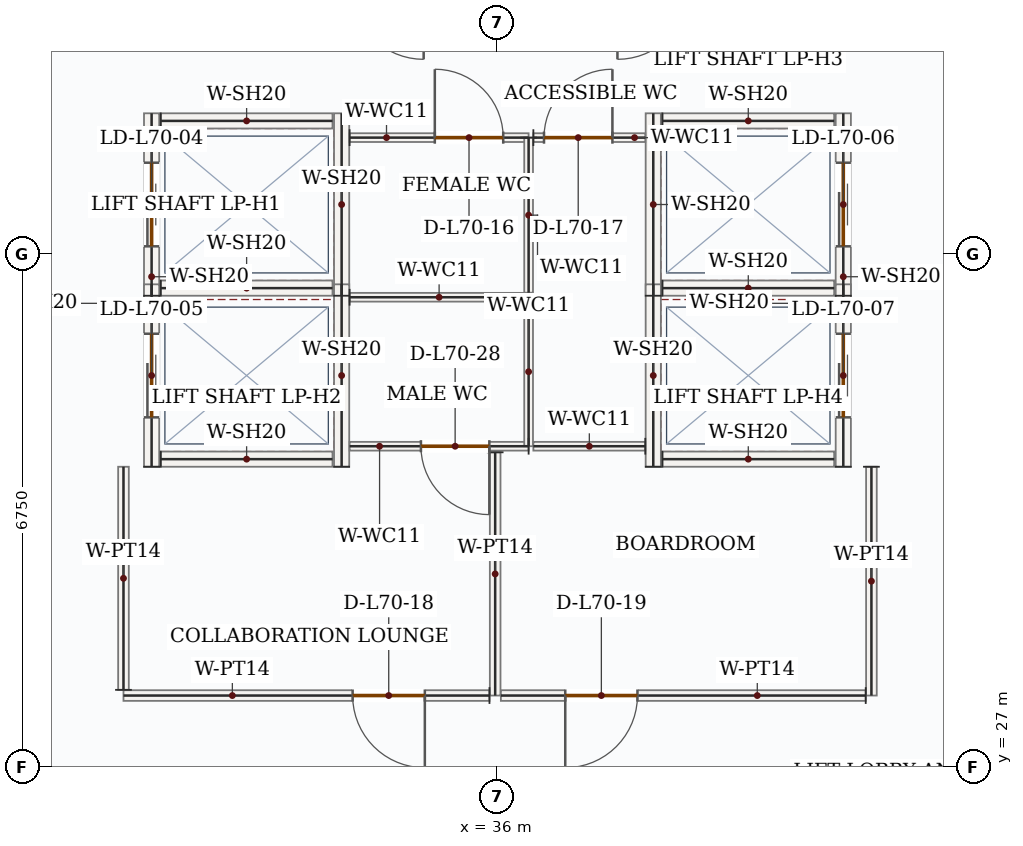
"""IFC4 building model, lengths in metres.
Left out: names, types, materials, properties, quantities, classifications, styles, units other than length and angle.
Written with IfcOpenShell. Run it as: python <this file> out.ifc"""

import sys

from ifc_helpers import new_model, si_unit, direction, frame, frame_2d, origin, place, context, subcontext, project, spatial, rectangle, extrude, source, transform, mapped, element, fill, save


model = new_model("IFC4")
c1 = context("Model", 3, precision=1e-05, world=origin(), true_north=direction((0.0, 1.0)))
c2 = subcontext(c1, "Body", "Model", "MODEL_VIEW")
j1 = project(units=[si_unit("LENGTHUNIT", "METRE"), si_unit("PLANEANGLEUNIT", "RADIAN")], contexts=[c1])
p1 = place(None, origin())
s1 = spatial("IfcSite", under=j1, at=p1, CompositionType="ELEMENT")
p2 = place(p1, origin())
s2 = spatial("IfcBuilding", under=s1, at=p2, CompositionType="ELEMENT")
p3 = place(p2, frame((0.0, 0.0, 291.6)))
s3 = spatial("IfcBuildingStorey", under=s2, at=p3, CompositionType="ELEMENT", Elevation=291.6)
p4 = place(p3, frame((31.45, 33.2, 0.0), z_axis=(0.0, 0.0, 1.0), x_axis=(0.0, 1.0, 0.0)))
e1 = element("IfcWall", 1, at=p4, inside=s3, PredefinedType="SOLIDWALL", context=c2, shape_type="SweptSolid", body=[
    extrude(rectangle(XDim=2.4, YDim=0.2, at=frame_2d((1.2, 0.0))), origin(), (0.0, 0.0, 1.0), 3.5),
])
p5 = place(p4, frame((0.65, 0.0, 0.0)))
e2 = element("IfcOpeningElement", 2, at=p5, cuts=e1, PredefinedType="OPENING", context=c2, shape_type="SweptSolid", body=[
    extrude(rectangle(XDim=1.1, YDim=2.15, at=frame_2d((0.55, 1.075))), frame((0.0, 0.11, 0.0), z_axis=(0.0, -1.0, 0.0), x_axis=(1.0, 0.0, 0.0)), (0.0, 0.0, 1.0), 0.22),
])
m1 = source(origin(), c2, "Body", "SweptSolid", [
    extrude(rectangle(XDim=2.4, YDim=0.2, at=frame_2d((1.2, 0.0))), origin(), (0.0, 0.0, 1.0), 3.5),
])
p6 = place(p3, frame((33.95, 33.2, 0.0), z_axis=(0.0, 0.0, 1.0), x_axis=(0.0, 1.0, 0.0)))
e3 = element("IfcWall", 3, at=p6, inside=s3, PredefinedType="SOLIDWALL", context=c2, shape_type="MappedRepresentation", body=[
    mapped(m1, transform((0.0, 0.0, 0.0), x_axis=(1.0, 0.0, 0.0), y_axis=(0.0, 1.0, 0.0), z_axis=(0.0, 0.0, 1.0), scale=1.0)),
])
m2 = source(origin(), c2, "Body", "SweptSolid", [
    extrude(rectangle(XDim=2.26, YDim=0.2, at=frame_2d((1.13, 0.0))), origin(), (0.0, 0.0, 1.0), 3.5),
])
for number, where, z_axis, x_axis in (
    (4, (31.57, 33.3, 0.0), (0.0, 0.0, 1.0), (1.0, 0.0, 0.0)),
    (5, (31.57, 35.5, 0.0), (0.0, 0.0, 1.0), (1.0, 0.0, 0.0)),
):
    element("IfcWall", number, at=place(p3, frame(where, z_axis=z_axis, x_axis=x_axis)), inside=s3, PredefinedType="SOLIDWALL", context=c2, shape_type="MappedRepresentation", body=[
        mapped(m2, transform((0.0, 0.0, 0.0), x_axis=(1.0, 0.0, 0.0), y_axis=(0.0, 1.0, 0.0), z_axis=(0.0, 0.0, 1.0), scale=1.0)),
    ])
p7 = place(p3, frame((31.45, 30.95, 0.0), z_axis=(0.0, 0.0, 1.0), x_axis=(0.0, 1.0, 0.0)))
e6 = element("IfcWall", 6, at=p7, inside=s3, PredefinedType="SOLIDWALL", context=c2, shape_type="SweptSolid", body=[
    extrude(rectangle(XDim=2.4, YDim=0.2, at=frame_2d((1.2, 0.0))), origin(), (0.0, 0.0, 1.0), 3.5),
])
p8 = place(p7, frame((0.65, 0.0, 0.0)))
e7 = element("IfcOpeningElement", 7, at=p8, cuts=e6, PredefinedType="OPENING", context=c2, shape_type="SweptSolid", body=[
    extrude(rectangle(XDim=1.1, YDim=2.15, at=frame_2d((0.55, 1.075))), frame((0.0, 0.11, 0.0), z_axis=(0.0, -1.0, 0.0), x_axis=(1.0, 0.0, 0.0)), (0.0, 0.0, 1.0), 0.22),
])
p9 = place(p3, frame((33.95, 30.95, 0.0), z_axis=(0.0, 0.0, 1.0), x_axis=(0.0, 1.0, 0.0)))
e8 = element("IfcWall", 8, at=p9, inside=s3, PredefinedType="SOLIDWALL", context=c2, shape_type="MappedRepresentation", body=[
    mapped(m1, transform((0.0, 0.0, 0.0), x_axis=(1.0, 0.0, 0.0), y_axis=(0.0, 1.0, 0.0), z_axis=(0.0, 0.0, 1.0), scale=1.0)),
])
p10 = place(p3, frame((31.57, 31.05, 0.0), z_axis=(0.0, 0.0, 1.0), x_axis=(1.0, 0.0, 0.0)))
e9 = element("IfcWall", 9, at=p10, inside=s3, PredefinedType="SOLIDWALL", context=c2, shape_type="MappedRepresentation", body=[
    mapped(m2, transform((0.0, 0.0, 0.0), x_axis=(1.0, 0.0, 0.0), y_axis=(0.0, 1.0, 0.0), z_axis=(0.0, 0.0, 1.0), scale=1.0)),
])
p11 = place(p3, frame((38.05, 33.2, 0.0), z_axis=(0.0, 0.0, 1.0), x_axis=(0.0, 1.0, 0.0)))
e10 = element("IfcWall", 10, at=p11, inside=s3, PredefinedType="SOLIDWALL", context=c2, shape_type="MappedRepresentation", body=[
    mapped(m1, transform((0.0, 0.0, 0.0), x_axis=(1.0, 0.0, 0.0), y_axis=(0.0, 1.0, 0.0), z_axis=(0.0, 0.0, 1.0), scale=1.0)),
])
p12 = place(p3, frame((40.55, 33.2, 0.0), z_axis=(0.0, 0.0, 1.0), x_axis=(0.0, 1.0, 0.0)))
e11 = element("IfcWall", 11, at=p12, inside=s3, PredefinedType="SOLIDWALL", context=c2, shape_type="SweptSolid", body=[
    extrude(rectangle(XDim=2.4, YDim=0.2, at=frame_2d((1.2, 0.0))), origin(), (0.0, 0.0, 1.0), 3.5),
])
p13 = place(p12, frame((0.65, 0.0, 0.0)))
e12 = element("IfcOpeningElement", 12, at=p13, cuts=e11, PredefinedType="OPENING", context=c2, shape_type="SweptSolid", body=[
    extrude(rectangle(XDim=1.1, YDim=2.15, at=frame_2d((0.55, 1.075))), frame((0.0, 0.11, 0.0), z_axis=(0.0, -1.0, 0.0), x_axis=(1.0, 0.0, 0.0)), (0.0, 0.0, 1.0), 0.22),
])
for number, where, z_axis, x_axis in (
    (13, (38.17, 33.3, 0.0), (0.0, 0.0, 1.0), (1.0, 0.0, 0.0)),
    (14, (38.17, 35.5, 0.0), (0.0, 0.0, 1.0), (1.0, 0.0, 0.0)),
):
    element("IfcWall", number, at=place(p3, frame(where, z_axis=z_axis, x_axis=x_axis)), inside=s3, PredefinedType="SOLIDWALL", context=c2, shape_type="MappedRepresentation", body=[
        mapped(m2, transform((0.0, 0.0, 0.0), x_axis=(1.0, 0.0, 0.0), y_axis=(0.0, 1.0, 0.0), z_axis=(0.0, 0.0, 1.0), scale=1.0)),
    ])
p14 = place(p3, frame((38.05, 30.95, 0.0), z_axis=(0.0, 0.0, 1.0), x_axis=(0.0, 1.0, 0.0)))
e15 = element("IfcWall", 15, at=p14, inside=s3, PredefinedType="SOLIDWALL", context=c2, shape_type="MappedRepresentation", body=[
    mapped(m1, transform((0.0, 0.0, 0.0), x_axis=(1.0, 0.0, 0.0), y_axis=(0.0, 1.0, 0.0), z_axis=(0.0, 0.0, 1.0), scale=1.0)),
])
p15 = place(p3, frame((40.55, 30.95, 0.0), z_axis=(0.0, 0.0, 1.0), x_axis=(0.0, 1.0, 0.0)))
e16 = element("IfcWall", 16, at=p15, inside=s3, PredefinedType="SOLIDWALL", context=c2, shape_type="SweptSolid", body=[
    extrude(rectangle(XDim=2.4, YDim=0.2, at=frame_2d((1.2, 0.0))), origin(), (0.0, 0.0, 1.0), 3.5),
])
p16 = place(p15, frame((0.65, 0.0, 0.0)))
e17 = element("IfcOpeningElement", 17, at=p16, cuts=e16, PredefinedType="OPENING", context=c2, shape_type="SweptSolid", body=[
    extrude(rectangle(XDim=1.1, YDim=2.15, at=frame_2d((0.55, 1.075))), frame((0.0, 0.11, 0.0), z_axis=(0.0, -1.0, 0.0), x_axis=(1.0, 0.0, 0.0)), (0.0, 0.0, 1.0), 0.22),
])
p17 = place(p3, frame((38.17, 31.05, 0.0), z_axis=(0.0, 0.0, 1.0), x_axis=(1.0, 0.0, 0.0)))
e18 = element("IfcWall", 18, at=p17, inside=s3, PredefinedType="SOLIDWALL", context=c2, shape_type="MappedRepresentation", body=[
    mapped(m2, transform((0.0, 0.0, 0.0), x_axis=(1.0, 0.0, 0.0), y_axis=(0.0, 1.0, 0.0), z_axis=(0.0, 0.0, 1.0), scale=1.0)),
])
p18 = place(p3, frame((36.41, 31.22, 0.0), z_axis=(0.0, 0.0, 1.0), x_axis=(-1.0, 0.0, 0.0)))
e19 = element("IfcWall", 19, at=p18, inside=s3, PredefinedType="PARTITIONING", context=c2, shape_type="SweptSolid", body=[
    extrude(rectangle(XDim=2.355, YDim=0.115, at=frame_2d((1.177, 0.0))), origin(), (0.0, 0.0, 1.0), 3.5),
])
p19 = place(p18, frame((0.517, 0.0, 0.0)))
e20 = element("IfcOpeningElement", 20, at=p19, cuts=e19, PredefinedType="OPENING", context=c2, shape_type="SweptSolid", body=[
    extrude(rectangle(XDim=0.9, YDim=2.1, at=frame_2d((0.45, 1.05))), frame((0.0, 0.067, 0.0), z_axis=(0.0, -1.0, 0.0), x_axis=(1.0, 0.0, 0.0)), (0.0, 0.0, 1.0), 0.135),
])
m3 = source(origin(), c2, "Body", "SweptSolid", [
    extrude(rectangle(XDim=2.355, YDim=0.115, at=frame_2d((1.177, 0.0))), origin(), (0.0, 0.0, 1.0), 3.5),
])
p20 = place(p3, frame((34.055, 33.18, 0.0), z_axis=(0.0, 0.0, 1.0), x_axis=(1.0, 0.0, 0.0)))
e21 = element("IfcWall", 21, at=p20, inside=s3, PredefinedType="PARTITIONING", context=c2, shape_type="MappedRepresentation", body=[
    mapped(m3, transform((0.0, 0.0, 0.0), x_axis=(1.0, 0.0, 0.0), y_axis=(0.0, 1.0, 0.0), z_axis=(0.0, 0.0, 1.0), scale=1.0)),
])
m4 = source(origin(), c2, "Body", "SweptSolid", [
    extrude(rectangle(XDim=1.96, YDim=0.115, at=frame_2d((0.98, 0.0))), origin(), (0.0, 0.0, 1.0), 3.5),
])
p21 = place(p3, frame((36.41, 33.18, 0.0), z_axis=(0.0, 0.0, 1.0), x_axis=(0.0, -1.0, 0.0)))
e22 = element("IfcWall", 22, at=p21, inside=s3, PredefinedType="PARTITIONING", context=c2, shape_type="MappedRepresentation", body=[
    mapped(m4, transform((0.0, 0.0, 0.0), x_axis=(1.0, 0.0, 0.0), y_axis=(0.0, 1.0, 0.0), z_axis=(0.0, 0.0, 1.0), scale=1.0)),
])
p22 = place(p3, frame((34.055, 35.28, 0.0), z_axis=(0.0, 0.0, 1.0), x_axis=(1.0, 0.0, 0.0)))
e23 = element("IfcWall", 23, at=p22, inside=s3, PredefinedType="PARTITIONING", context=c2, shape_type="SweptSolid", body=[
    extrude(rectangle(XDim=2.355, YDim=0.115, at=frame_2d((1.177, 0.0))), origin(), (0.0, 0.0, 1.0), 3.5),
])
p23 = place(p22, frame((1.121, 0.0, 0.0)))
e24 = element("IfcOpeningElement", 24, at=p23, cuts=e23, PredefinedType="OPENING", context=c2, shape_type="SweptSolid", body=[
    extrude(rectangle(XDim=0.9, YDim=2.1, at=frame_2d((0.45, 1.05))), frame((0.0, 0.067, 0.0), z_axis=(0.0, -1.0, 0.0), x_axis=(1.0, 0.0, 0.0)), (0.0, 0.0, 1.0), 0.135),
])
m5 = source(origin(), c2, "Body", "SweptSolid", [
    extrude(rectangle(XDim=2.04, YDim=0.115, at=frame_2d((1.02, 0.0))), origin(), (0.0, 0.0, 1.0), 3.5),
])
p24 = place(p3, frame((36.41, 35.28, 0.0), z_axis=(0.0, 0.0, 1.0), x_axis=(0.0, -1.0, 0.0)))
e25 = element("IfcWall", 25, at=p24, inside=s3, PredefinedType="PARTITIONING", context=c2, shape_type="MappedRepresentation", body=[
    mapped(m5, transform((0.0, 0.0, 0.0), x_axis=(1.0, 0.0, 0.0), y_axis=(0.0, 1.0, 0.0), z_axis=(0.0, 0.0, 1.0), scale=1.0)),
])
m6 = source(origin(), c2, "Body", "SweptSolid", [
    extrude(rectangle(XDim=1.473, YDim=0.115, at=frame_2d((0.736, 0.0))), origin(), (0.0, 0.0, 1.0), 3.5),
])
p25 = place(p3, frame((37.945, 31.22, 0.0), z_axis=(0.0, 0.0, 1.0), x_axis=(-1.0, 0.0, 0.0)))
e26 = element("IfcWall", 26, at=p25, inside=s3, PredefinedType="PARTITIONING", context=c2, shape_type="MappedRepresentation", body=[
    mapped(m6, transform((0.0, 0.0, 0.0), x_axis=(1.0, 0.0, 0.0), y_axis=(0.0, 1.0, 0.0), z_axis=(0.0, 0.0, 1.0), scale=1.0)),
])
p26 = place(p3, frame((36.472, 35.28, 0.0), z_axis=(0.0, 0.0, 1.0), x_axis=(1.0, 0.0, 0.0)))
e27 = element("IfcWall", 27, at=p26, inside=s3, PredefinedType="PARTITIONING", context=c2, shape_type="SweptSolid", body=[
    extrude(rectangle(XDim=1.473, YDim=0.115, at=frame_2d((0.736, 0.0))), origin(), (0.0, 0.0, 1.0), 3.5),
])
p27 = place(p26, frame((0.14, 0.0, 0.0)))
e28 = element("IfcOpeningElement", 28, at=p27, cuts=e27, PredefinedType="OPENING", context=c2, shape_type="SweptSolid", body=[
    extrude(rectangle(XDim=0.9, YDim=2.1, at=frame_2d((0.45, 1.05))), frame((0.0, 0.067, 0.0), z_axis=(0.0, -1.0, 0.0), x_axis=(1.0, 0.0, 0.0)), (0.0, 0.0, 1.0), 0.135),
])
m7 = source(origin(), c2, "Body", "SweptSolid", [
    extrude(rectangle(XDim=3.2, YDim=0.14, at=frame_2d((1.6, 0.0))), origin(), (0.0, 0.0, 1.0), 3.5),
])
p28 = place(p3, frame((35.97, 31.14, 0.0), z_axis=(0.0, 0.0, 1.0), x_axis=(0.0, -1.0, 0.0)))
e29 = element("IfcWall", 29, at=p28, inside=s3, PredefinedType="PARTITIONING", context=c2, shape_type="MappedRepresentation", body=[
    mapped(m7, transform((0.0, 0.0, 0.0), x_axis=(1.0, 0.0, 0.0), y_axis=(0.0, 1.0, 0.0), z_axis=(0.0, 0.0, 1.0), scale=1.0)),
])
p29 = place(p3, frame((35.895, 27.94, 0.0), z_axis=(0.0, 0.0, 1.0), x_axis=(-1.0, 0.0, 0.0)))
e30 = element("IfcWall", 30, at=p29, inside=s3, PredefinedType="PARTITIONING", context=c2, shape_type="SweptSolid", body=[
    extrude(rectangle(XDim=4.815, YDim=0.14, at=frame_2d((2.407, 0.0))), origin(), (0.0, 0.0, 1.0), 3.5),
])
p30 = place(p29, frame((0.85, 0.0, 0.0)))
e31 = element("IfcOpeningElement", 31, at=p30, cuts=e30, PredefinedType="OPENING", context=c2, shape_type="SweptSolid", body=[
    extrude(rectangle(XDim=0.95, YDim=2.15, at=frame_2d((0.475, 1.075))), frame((0.0, 0.08, 0.0), z_axis=(0.0, -1.0, 0.0), x_axis=(1.0, 0.0, 0.0)), (0.0, 0.0, 1.0), 0.16),
])
m8 = source(origin(), c2, "Body", "SweptSolid", [
    extrude(rectangle(XDim=2.935, YDim=0.14, at=frame_2d((1.468, 0.0))), origin(), (0.0, 0.0, 1.0), 3.5),
])
p31 = place(p3, frame((31.08, 28.015, 0.0), z_axis=(0.0, 0.0, 1.0), x_axis=(0.0, 1.0, 0.0)))
e32 = element("IfcWall", 32, at=p31, inside=s3, PredefinedType="PARTITIONING", context=c2, shape_type="MappedRepresentation", body=[
    mapped(m8, transform((0.0, 0.0, 0.0), x_axis=(1.0, 0.0, 0.0), y_axis=(0.0, 1.0, 0.0), z_axis=(0.0, 0.0, 1.0), scale=1.0)),
])
m9 = source(origin(), c2, "Body", "SweptSolid", [
    extrude(rectangle(XDim=3.01, YDim=0.14, at=frame_2d((1.505, 0.0))), origin(), (0.0, 0.0, 1.0), 3.5),
])
p32 = place(p3, frame((40.92, 30.95, 0.0), z_axis=(0.0, 0.0, 1.0), x_axis=(0.0, -1.0, 0.0)))
e33 = element("IfcWall", 33, at=p32, inside=s3, PredefinedType="PARTITIONING", context=c2, shape_type="MappedRepresentation", body=[
    mapped(m9, transform((0.0, 0.0, 0.0), x_axis=(1.0, 0.0, 0.0), y_axis=(0.0, 1.0, 0.0), z_axis=(0.0, 0.0, 1.0), scale=1.0)),
])
p33 = place(p3, frame((40.845, 27.94, 0.0), z_axis=(0.0, 0.0, 1.0), x_axis=(-1.0, 0.0, 0.0)))
e34 = element("IfcWall", 34, at=p33, inside=s3, PredefinedType="PARTITIONING", context=c2, shape_type="SweptSolid", body=[
    extrude(rectangle(XDim=4.8, YDim=0.14, at=frame_2d((2.4, 0.0))), origin(), (0.0, 0.0, 1.0), 3.5),
])
p34 = place(p33, frame((3.003, 0.0, 0.0)))
e35 = element("IfcOpeningElement", 35, at=p34, cuts=e34, PredefinedType="OPENING", context=c2, shape_type="SweptSolid", body=[
    extrude(rectangle(XDim=0.95, YDim=2.15, at=frame_2d((0.475, 1.075))), frame((0.0, 0.08, 0.0), z_axis=(0.0, -1.0, 0.0), x_axis=(1.0, 0.0, 0.0)), (0.0, 0.0, 1.0), 0.16),
])
m10 = source(origin(), c2, "Body", "SweptSolid", [
    extrude(rectangle(XDim=1.1, YDim=2.15, at=frame_2d((0.55, 1.075))), frame((0.0, 0.025, 0.0), z_axis=(0.0, -1.0, 0.0), x_axis=(1.0, 0.0, 0.0)), (0.0, 0.0, 1.0), 0.05),
])
p35 = place(p5, origin())
e36 = element("IfcDoor", 36, at=p35, inside=s3, OperationType="DOUBLE_DOOR_SLIDING", PredefinedType="DOOR", context=c2, shape_type="MappedRepresentation", body=[
    mapped(m10, transform((0.0, 0.0, 0.0), x_axis=(1.0, 0.0, 0.0), y_axis=(0.0, 1.0, 0.0), z_axis=(0.0, 0.0, 1.0), scale=1.0)),
])
fill(e2, e36)
p36 = place(p8, origin())
e37 = element("IfcDoor", 37, at=p36, inside=s3, OperationType="DOUBLE_DOOR_SLIDING", PredefinedType="DOOR", context=c2, shape_type="MappedRepresentation", body=[
    mapped(m10, transform((0.0, 0.0, 0.0), x_axis=(1.0, 0.0, 0.0), y_axis=(0.0, 1.0, 0.0), z_axis=(0.0, 0.0, 1.0), scale=1.0)),
])
fill(e7, e37)
p37 = place(p13, origin())
e38 = element("IfcDoor", 38, at=p37, inside=s3, OperationType="DOUBLE_DOOR_SLIDING", PredefinedType="DOOR", context=c2, shape_type="MappedRepresentation", body=[
    mapped(m10, transform((0.0, 0.0, 0.0), x_axis=(1.0, 0.0, 0.0), y_axis=(0.0, 1.0, 0.0), z_axis=(0.0, 0.0, 1.0), scale=1.0)),
])
fill(e12, e38)
p38 = place(p16, origin())
e39 = element("IfcDoor", 39, at=p38, inside=s3, OperationType="DOUBLE_DOOR_SLIDING", PredefinedType="DOOR", context=c2, shape_type="MappedRepresentation", body=[
    mapped(m10, transform((0.0, 0.0, 0.0), x_axis=(1.0, 0.0, 0.0), y_axis=(0.0, 1.0, 0.0), z_axis=(0.0, 0.0, 1.0), scale=1.0)),
])
fill(e17, e39)
m11 = source(origin(), c2, "Body", "SweptSolid", [
    extrude(rectangle(XDim=0.9, YDim=2.1, at=frame_2d((0.45, 1.05))), frame((0.0, 0.025, 0.0), z_axis=(0.0, -1.0, 0.0), x_axis=(1.0, 0.0, 0.0)), (0.0, 0.0, 1.0), 0.05),
])
p39 = place(p23, origin())
e40 = element("IfcDoor", 40, at=p39, inside=s3, OperationType="SINGLE_SWING_LEFT", PredefinedType="DOOR", context=c2, shape_type="MappedRepresentation", body=[
    mapped(m11, transform((0.0, 0.0, 0.0), x_axis=(1.0, 0.0, 0.0), y_axis=(0.0, 1.0, 0.0), z_axis=(0.0, 0.0, 1.0), scale=1.0)),
])
fill(e24, e40)
p40 = place(p27, origin())
e41 = element("IfcDoor", 41, at=p40, inside=s3, OperationType="SINGLE_SWING_RIGHT", PredefinedType="DOOR", context=c2, shape_type="MappedRepresentation", body=[
    mapped(m11, transform((0.0, 0.0, 0.0), x_axis=(1.0, 0.0, 0.0), y_axis=(0.0, 1.0, 0.0), z_axis=(0.0, 0.0, 1.0), scale=1.0)),
])
fill(e28, e41)
m12 = source(origin(), c2, "Body", "SweptSolid", [
    extrude(rectangle(XDim=0.95, YDim=2.15, at=frame_2d((0.475, 1.075))), frame((0.0, 0.025, 0.0), z_axis=(0.0, -1.0, 0.0), x_axis=(1.0, 0.0, 0.0)), (0.0, 0.0, 1.0), 0.05),
])
p41 = place(p30, origin())
e42 = element("IfcDoor", 42, at=p41, inside=s3, OperationType="SINGLE_SWING_LEFT", PredefinedType="DOOR", context=c2, shape_type="MappedRepresentation", body=[
    mapped(m12, transform((0.0, 0.0, 0.0), x_axis=(1.0, 0.0, 0.0), y_axis=(0.0, 1.0, 0.0), z_axis=(0.0, 0.0, 1.0), scale=1.0)),
])
fill(e31, e42)
p42 = place(p34, origin())
e43 = element("IfcDoor", 43, at=p42, inside=s3, OperationType="SINGLE_SWING_RIGHT", PredefinedType="DOOR", context=c2, shape_type="MappedRepresentation", body=[
    mapped(m12, transform((0.0, 0.0, 0.0), x_axis=(1.0, 0.0, 0.0), y_axis=(0.0, 1.0, 0.0), z_axis=(0.0, 0.0, 1.0), scale=1.0)),
])
fill(e35, e43)
p43 = place(p19, origin())
e44 = element("IfcDoor", 44, at=p43, inside=s3, OperationType="SINGLE_SWING_LEFT", PredefinedType="DOOR", context=c2, shape_type="MappedRepresentation", body=[
    mapped(m11, transform((0.0, 0.0, 0.0), x_axis=(1.0, 0.0, 0.0), y_axis=(0.0, 1.0, 0.0), z_axis=(0.0, 0.0, 1.0), scale=1.0)),
])
fill(e20, e44)
save(model, sys.argv[1])
